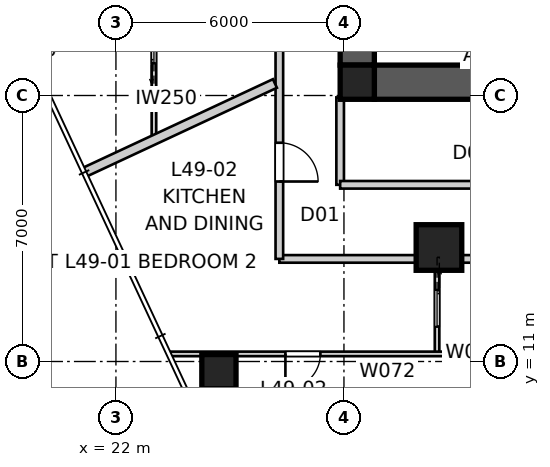
"""IFC4 building model, lengths in metres.
Left out: names, types, materials, properties, quantities, classifications, styles, units other than length and angle.
Written with IfcOpenShell. Run it as: python <this file> out.ifc"""

import sys

from ifc_helpers import new_model, si_unit, direction, frame, frame_2d, origin, origin_2d, place, context, subcontext, project, spatial, polyline, rectangle, outline, extrude, element, fill, save


model = new_model("IFC4")
c1 = context("Model", 3, precision=1e-05, world=origin(), true_north=direction((0.0, 1.0)))
c2 = subcontext(c1, "Body", "Model", "MODEL_VIEW")
j1 = project(units=[si_unit("LENGTHUNIT", "METRE"), si_unit("PLANEANGLEUNIT", "RADIAN")], contexts=[c1])
p1 = place(None, origin())
s1 = spatial("IfcSite", under=j1, at=p1, CompositionType="ELEMENT")
p2 = place(p1, origin())
s2 = spatial("IfcBuilding", under=s1, at=p2, CompositionType="ELEMENT")
p3 = place(p2, frame((0.0, 0.0, 179.4)))
s3 = spatial("IfcBuildingStorey", under=s2, at=p3, CompositionType="ELEMENT", Elevation=179.4)
p4 = place(p3, frame((51.2, 18.35, 0.0), z_axis=(0.0, 0.0, 1.0), x_axis=(-1.0, 0.0, 0.0)))
e1 = element("IfcWall", 1, at=p4, inside=s3, PredefinedType="SHEAR", context=c2, shape_type="SweptSolid", body=[
    extrude(outline(polyline([(0.0, -0.45), (22.4, -0.45), (22.4, -0.025), (22.85, -0.025), (22.85, 0.025), (22.4, 0.025), (22.4, 0.45), (0.0, 0.45), (0.0, 0.025), (-0.45, 0.025), (-0.45, -0.025), (0.0, -0.025), (0.0, -0.45)])), origin(), (0.0, 0.0, 1.0), 3.4),
])
p5 = place(p3, frame((28.35, 41.2, 0.0), z_axis=(0.0, 0.0, 1.0), x_axis=(0.0, -1.0, 0.0)))
e2 = element("IfcWall", 2, at=p5, inside=s3, PredefinedType="SHEAR", context=c2, shape_type="SweptSolid", body=[
    extrude(outline(polyline([(0.0, -0.45), (22.4, -0.45), (22.4, -0.025), (22.85, -0.025), (22.85, 0.025), (22.4, 0.025), (22.4, 0.45), (0.0, 0.45), (0.0, 0.025), (-0.45, 0.025), (-0.45, -0.025), (0.0, -0.025), (0.0, -0.45)])), origin(), (0.0, 0.0, 1.0), 3.4),
])
p6 = place(p5, frame((11.14, 0.0, 0.0)))
e3 = element("IfcOpeningElement", 3, at=p6, cuts=e2, PredefinedType="OPENING", context=c2, shape_type="SweptSolid", body=[
    extrude(rectangle(XDim=1.02, YDim=2.4, at=frame_2d((0.51, 1.2))), frame((0.0, 0.46, 0.0), z_axis=(0.0, -1.0, 0.0), x_axis=(1.0, 0.0, 0.0)), (0.0, 0.0, 1.0), 0.92),
])
for number, where, z_axis, x_axis in (
    (4, (28.35, 18.35, 0.0), (0.0, 0.0, 1.0), (1.0, 0.0, 0.0)),
    (5, (24.71, 10.733, 0.0), (0.0, 0.0, 1.0), (1.0, 0.0, 0.0)),
):
    element("IfcColumn", number, at=place(p3, frame(where, z_axis=z_axis, x_axis=x_axis)), inside=s3, PredefinedType="COLUMN", context=c2, shape_type="SweptSolid", body=[
        extrude(rectangle(XDim=0.9, YDim=0.9, at=origin_2d()), origin(), (0.0, 0.0, 1.0), 3.4),
    ])
p7 = place(p3, frame((30.5, 14.0, 0.0), z_axis=(0.0, 0.0, 1.0), x_axis=(1.0, 0.0, 0.0)))
e6 = element("IfcColumn", 6, at=p7, inside=s3, PredefinedType="COLUMN", context=c2, shape_type="SweptSolid", body=[
    extrude(rectangle(XDim=1.2, YDim=1.2, at=origin_2d()), origin(), (0.0, 0.0, 1.0), 3.4),
])
p8 = place(p3, frame((26.3, 13.7, 0.0), z_axis=(0.0, 0.0, 1.0), x_axis=(1.0, 0.0, 0.0)))
e7 = element("IfcWall", 7, at=p8, inside=s3, PredefinedType="PARTITIONING", context=c2, shape_type="SweptSolid", body=[
    extrude(rectangle(XDim=4.458, YDim=0.2, at=frame_2d((2.229, 0.0))), origin(), (0.0, 0.0, 1.0), 3.25),
])
p9 = place(p3, frame((30.758, 13.7, 0.0), z_axis=(0.0, 0.0, 1.0), x_axis=(1.0, 0.0, 0.0)))
e8 = element("IfcWall", 8, at=p9, inside=s3, PredefinedType="PARTITIONING", context=c2, shape_type="SweptSolid", body=[
    extrude(rectangle(XDim=1.683, YDim=0.2, at=frame_2d((0.842, 0.0))), origin(), (0.0, 0.0, 1.0), 2.55),
])
p10 = place(p3, frame((26.3, 46.3, 0.0), z_axis=(0.0, 0.0, 1.0), x_axis=(0.0, -1.0, 0.0)))
e9 = element("IfcWall", 9, at=p10, inside=s3, PredefinedType="PARTITIONING", context=c2, shape_type="SweptSolid", body=[
    extrude(rectangle(XDim=32.6, YDim=0.2, at=frame_2d((16.3, 0.0))), origin(), (0.0, 0.0, 1.0), 3.25),
])
p11 = place(p10, frame((3.156, 0.0, 0.0)))
e10 = element("IfcOpeningElement", 10, at=p11, cuts=e9, PredefinedType="OPENING", context=c2, shape_type="SweptSolid", body=[
    extrude(rectangle(XDim=1.02, YDim=2.1, at=frame_2d((0.51, 1.05))), frame((0.0, 0.11, 0.0), z_axis=(0.0, -1.0, 0.0), x_axis=(1.0, 0.0, 0.0)), (0.0, 0.0, 1.0), 0.22),
])
p12 = place(p10, frame((14.68, 0.0, 0.0)))
e11 = element("IfcOpeningElement", 11, at=p12, cuts=e9, PredefinedType="OPENING", context=c2, shape_type="SweptSolid", body=[
    extrude(rectangle(XDim=1.02, YDim=2.34, at=frame_2d((0.51, 1.17))), frame((0.0, 0.11, 0.0), z_axis=(0.0, -1.0, 0.0), x_axis=(1.0, 0.0, 0.0)), (0.0, 0.0, 1.0), 0.22),
])
p13 = place(p10, frame((29.543, 0.0, 0.0)))
e12 = element("IfcOpeningElement", 12, at=p13, cuts=e9, PredefinedType="OPENING", context=c2, shape_type="SweptSolid", body=[
    extrude(rectangle(XDim=1.02, YDim=2.34, at=frame_2d((0.51, 1.17))), frame((0.0, 0.11, 0.0), z_axis=(0.0, -1.0, 0.0), x_axis=(1.0, 0.0, 0.0)), (0.0, 0.0, 1.0), 0.22),
])
p14 = place(p3, frame((21.162, 15.975, 0.0), z_axis=(0.0, 0.0, 1.0), x_axis=(0.906309193024, 0.422615246577, 0.0)))
e13 = element("IfcWall", 13, at=p14, inside=s3, PredefinedType="PARTITIONING", context=c2, shape_type="SweptSolid", body=[
    extrude(rectangle(XDim=5.54, YDim=0.25, at=frame_2d((2.77, 0.0))), origin(), (0.0, 0.0, 1.0), 3.25),
])
p15 = place(p3, frame((27.9, 17.95, 0.0), z_axis=(0.0, 0.0, 1.0), x_axis=(0.0, -1.0, 0.0)))
e14 = element("IfcWall", 14, at=p15, inside=s3, PredefinedType="PARTITIONING", context=c2, shape_type="SweptSolid", body=[
    extrude(rectangle(XDim=2.3, YDim=0.2, at=frame_2d((1.15, 0.0))), origin(), (0.0, 0.0, 1.0), 3.25),
])
p16 = place(p3, frame((27.9, 15.65, 0.0), z_axis=(0.0, 0.0, 1.0), x_axis=(1.0, 0.0, 0.0)))
e15 = element("IfcWall", 15, at=p16, inside=s3, PredefinedType="PARTITIONING", context=c2, shape_type="SweptSolid", body=[
    extrude(rectangle(XDim=24.2, YDim=0.2, at=frame_2d((12.1, 0.0))), origin(), (0.0, 0.0, 1.0), 3.25),
])
p17 = place(p16, frame((4.391, 0.0, 0.0)))
e16 = element("IfcOpeningElement", 16, at=p17, cuts=e15, PredefinedType="OPENING", context=c2, shape_type="SweptSolid", body=[
    extrude(rectangle(XDim=1.02, YDim=2.1, at=frame_2d((0.51, 1.05))), frame((0.0, 0.11, 0.0), z_axis=(0.0, -1.0, 0.0), x_axis=(1.0, 0.0, 0.0)), (0.0, 0.0, 1.0), 0.22),
])
p18 = place(p16, frame((18.789, 0.0, 0.0)))
e17 = element("IfcOpeningElement", 17, at=p18, cuts=e15, PredefinedType="OPENING", context=c2, shape_type="SweptSolid", body=[
    extrude(rectangle(XDim=1.02, YDim=2.1, at=frame_2d((0.51, 1.05))), frame((0.0, 0.11, 0.0), z_axis=(0.0, -1.0, 0.0), x_axis=(1.0, 0.0, 0.0)), (0.0, 0.0, 1.0), 0.22),
])
p19 = place(p16, frame((11.59, 0.0, 0.0)))
e18 = element("IfcOpeningElement", 18, at=p19, cuts=e15, PredefinedType="OPENING", context=c2, shape_type="SweptSolid", body=[
    extrude(rectangle(XDim=1.02, YDim=2.1, at=frame_2d((0.51, 1.05))), frame((0.0, 0.11, 0.0), z_axis=(0.0, -1.0, 0.0), x_axis=(1.0, 0.0, 0.0)), (0.0, 0.0, 1.0), 0.22),
])
p20 = place(p3, frame((23.0, 16.832, 0.0), z_axis=(0.0, 0.0, 1.0), x_axis=(0.0, 1.0, 0.0)))
e19 = element("IfcWall", 19, at=p20, inside=s3, PredefinedType="PARTITIONING", context=c2, shape_type="SweptSolid", body=[
    extrude(rectangle(XDim=30.574, YDim=0.12, at=frame_2d((15.287, 0.0))), origin(), (0.0, 0.0, 1.0), 2.55),
])
p21 = place(p20, frame((26.093, 0.0, 0.0)))
e20 = element("IfcOpeningElement", 20, at=p21, cuts=e19, PredefinedType="OPENING", context=c2, shape_type="SweptSolid", body=[
    extrude(rectangle(XDim=0.92, YDim=2.34, at=frame_2d((0.46, 1.17))), frame((0.0, 0.07, 0.0), z_axis=(0.0, -1.0, 0.0), x_axis=(1.0, 0.0, 0.0)), (0.0, 0.0, 1.0), 0.14),
])
p22 = place(p20, frame((13.012, 0.0, 0.0)))
e21 = element("IfcOpeningElement", 21, at=p22, cuts=e19, PredefinedType="OPENING", context=c2, shape_type="SweptSolid", body=[
    extrude(rectangle(XDim=0.92, YDim=2.34, at=frame_2d((0.46, 1.17))), frame((0.0, 0.07, 0.0), z_axis=(0.0, -1.0, 0.0), x_axis=(1.0, 0.0, 0.0)), (0.0, 0.0, 1.0), 0.14),
])
p23 = place(p20, frame((19.16, 0.0, 0.0)))
e22 = element("IfcOpeningElement", 22, at=p23, cuts=e19, PredefinedType="OPENING", context=c2, shape_type="SweptSolid", body=[
    extrude(rectangle(XDim=0.96, YDim=2.1, at=frame_2d((0.48, 1.05))), frame((0.0, 0.07, 0.0), z_axis=(0.0, -1.0, 0.0), x_axis=(1.0, 0.0, 0.0)), (0.0, 0.0, 1.0), 0.14),
])
p24 = place(p20, frame((2.018, 0.0, 0.0)))
e23 = element("IfcOpeningElement", 23, at=p24, cuts=e19, PredefinedType="OPENING", context=c2, shape_type="SweptSolid", body=[
    extrude(rectangle(XDim=0.96, YDim=2.1, at=frame_2d((0.48, 1.05))), frame((0.0, 0.07, 0.0), z_axis=(0.0, -1.0, 0.0), x_axis=(1.0, 0.0, 0.0)), (0.0, 0.0, 1.0), 0.14),
])
p25 = place(p3, frame((30.45, 13.6, 0.0), z_axis=(0.0, 0.0, 1.0), x_axis=(0.0, -1.0, 0.0)))
e24 = element("IfcWall", 24, at=p25, inside=s3, PredefinedType="PARTITIONING", context=c2, shape_type="SweptSolid", body=[
    extrude(rectangle(XDim=2.4, YDim=0.12, at=frame_2d((1.2, 0.0))), origin(), (0.0, 0.0, 1.0), 3.25),
])
p26 = place(p25, frame((0.72, 0.0, 0.0)))
e25 = element("IfcOpeningElement", 25, at=p26, cuts=e24, PredefinedType="OPENING", context=c2, shape_type="SweptSolid", body=[
    extrude(rectangle(XDim=0.96, YDim=2.1, at=frame_2d((0.48, 1.05))), frame((0.0, 0.07, 0.0), z_axis=(0.0, -1.0, 0.0), x_axis=(1.0, 0.0, 0.0)), (0.0, 0.0, 1.0), 0.14),
])
p27 = place(p3, frame((33.25, 11.2, 0.0), z_axis=(0.0, 0.0, 1.0), x_axis=(-1.0, 0.0, 0.0)))
e26 = element("IfcWall", 26, at=p27, inside=s3, PredefinedType="PARTITIONING", context=c2, shape_type="SweptSolid", body=[
    extrude(rectangle(XDim=9.817, YDim=0.12, at=frame_2d((4.908, 0.0))), origin(), (0.0, 0.0, 1.0), 3.25),
])
p28 = place(p27, frame((5.871, 0.0, 0.0)))
e27 = element("IfcOpeningElement", 27, at=p28, cuts=e26, PredefinedType="OPENING", context=c2, shape_type="SweptSolid", body=[
    extrude(rectangle(XDim=0.92, YDim=2.34, at=frame_2d((0.46, 1.17))), frame((0.0, 0.07, 0.0), z_axis=(0.0, -1.0, 0.0), x_axis=(1.0, 0.0, 0.0)), (0.0, 0.0, 1.0), 0.14),
])
p29 = place(p3, frame((25.213, 7.382, 0.0), z_axis=(0.0, 0.0, 1.0), x_axis=(0.906310464333, 0.422612520212, 0.0)))
e28 = element("IfcWall", 28, at=p29, inside=s3, PredefinedType="PARTITIONING", context=c2, shape_type="SweptSolid", body=[
    extrude(rectangle(XDim=8.913, YDim=0.12, at=frame_2d((4.456, 0.0))), origin(), (0.0, 0.0, 1.0), 3.25),
])
p30 = place(p13, origin())
e29 = element("IfcDoor", 29, at=p30, inside=s3, OperationType="SINGLE_SWING_RIGHT", PredefinedType="DOOR", context=c2, shape_type="SweptSolid", body=[
    extrude(rectangle(XDim=1.02, YDim=2.34, at=frame_2d((0.51, 1.17))), frame((0.0, 0.025, 0.0), z_axis=(0.0, -1.0, 0.0), x_axis=(1.0, 0.0, 0.0)), (0.0, 0.0, 1.0), 0.05),
])
fill(e12, e29)
p31 = place(p28, origin())
e30 = element("IfcDoor", 30, at=p31, inside=s3, OperationType="SINGLE_SWING_RIGHT", PredefinedType="DOOR", context=c2, shape_type="SweptSolid", body=[
    extrude(rectangle(XDim=0.92, YDim=2.34, at=frame_2d((0.46, 1.17))), frame((0.0, 0.025, 0.0), z_axis=(0.0, -1.0, 0.0), x_axis=(1.0, 0.0, 0.0)), (0.0, 0.0, 1.0), 0.05),
])
fill(e27, e30)
p32 = place(p26, origin())
e31 = element("IfcDoor", 31, at=p32, inside=s3, OperationType="SLIDING_TO_LEFT", PredefinedType="DOOR", context=c2, shape_type="SweptSolid", body=[
    extrude(rectangle(XDim=0.96, YDim=2.1, at=frame_2d((0.48, 1.05))), frame((0.0, 0.025, 0.0), z_axis=(0.0, -1.0, 0.0), x_axis=(1.0, 0.0, 0.0)), (0.0, 0.0, 1.0), 0.05),
])
fill(e25, e31)
p33 = place(p24, origin())
e32 = element("IfcDoor", 32, at=p33, inside=s3, OperationType="SLIDING_TO_LEFT", PredefinedType="DOOR", context=c2, shape_type="SweptSolid", body=[
    extrude(rectangle(XDim=0.96, YDim=2.1, at=frame_2d((0.48, 1.05))), frame((0.0, 0.025, 0.0), z_axis=(0.0, -1.0, 0.0), x_axis=(1.0, 0.0, 0.0)), (0.0, 0.0, 1.0), 0.05),
])
fill(e23, e32)
save(model, sys.argv[1])
